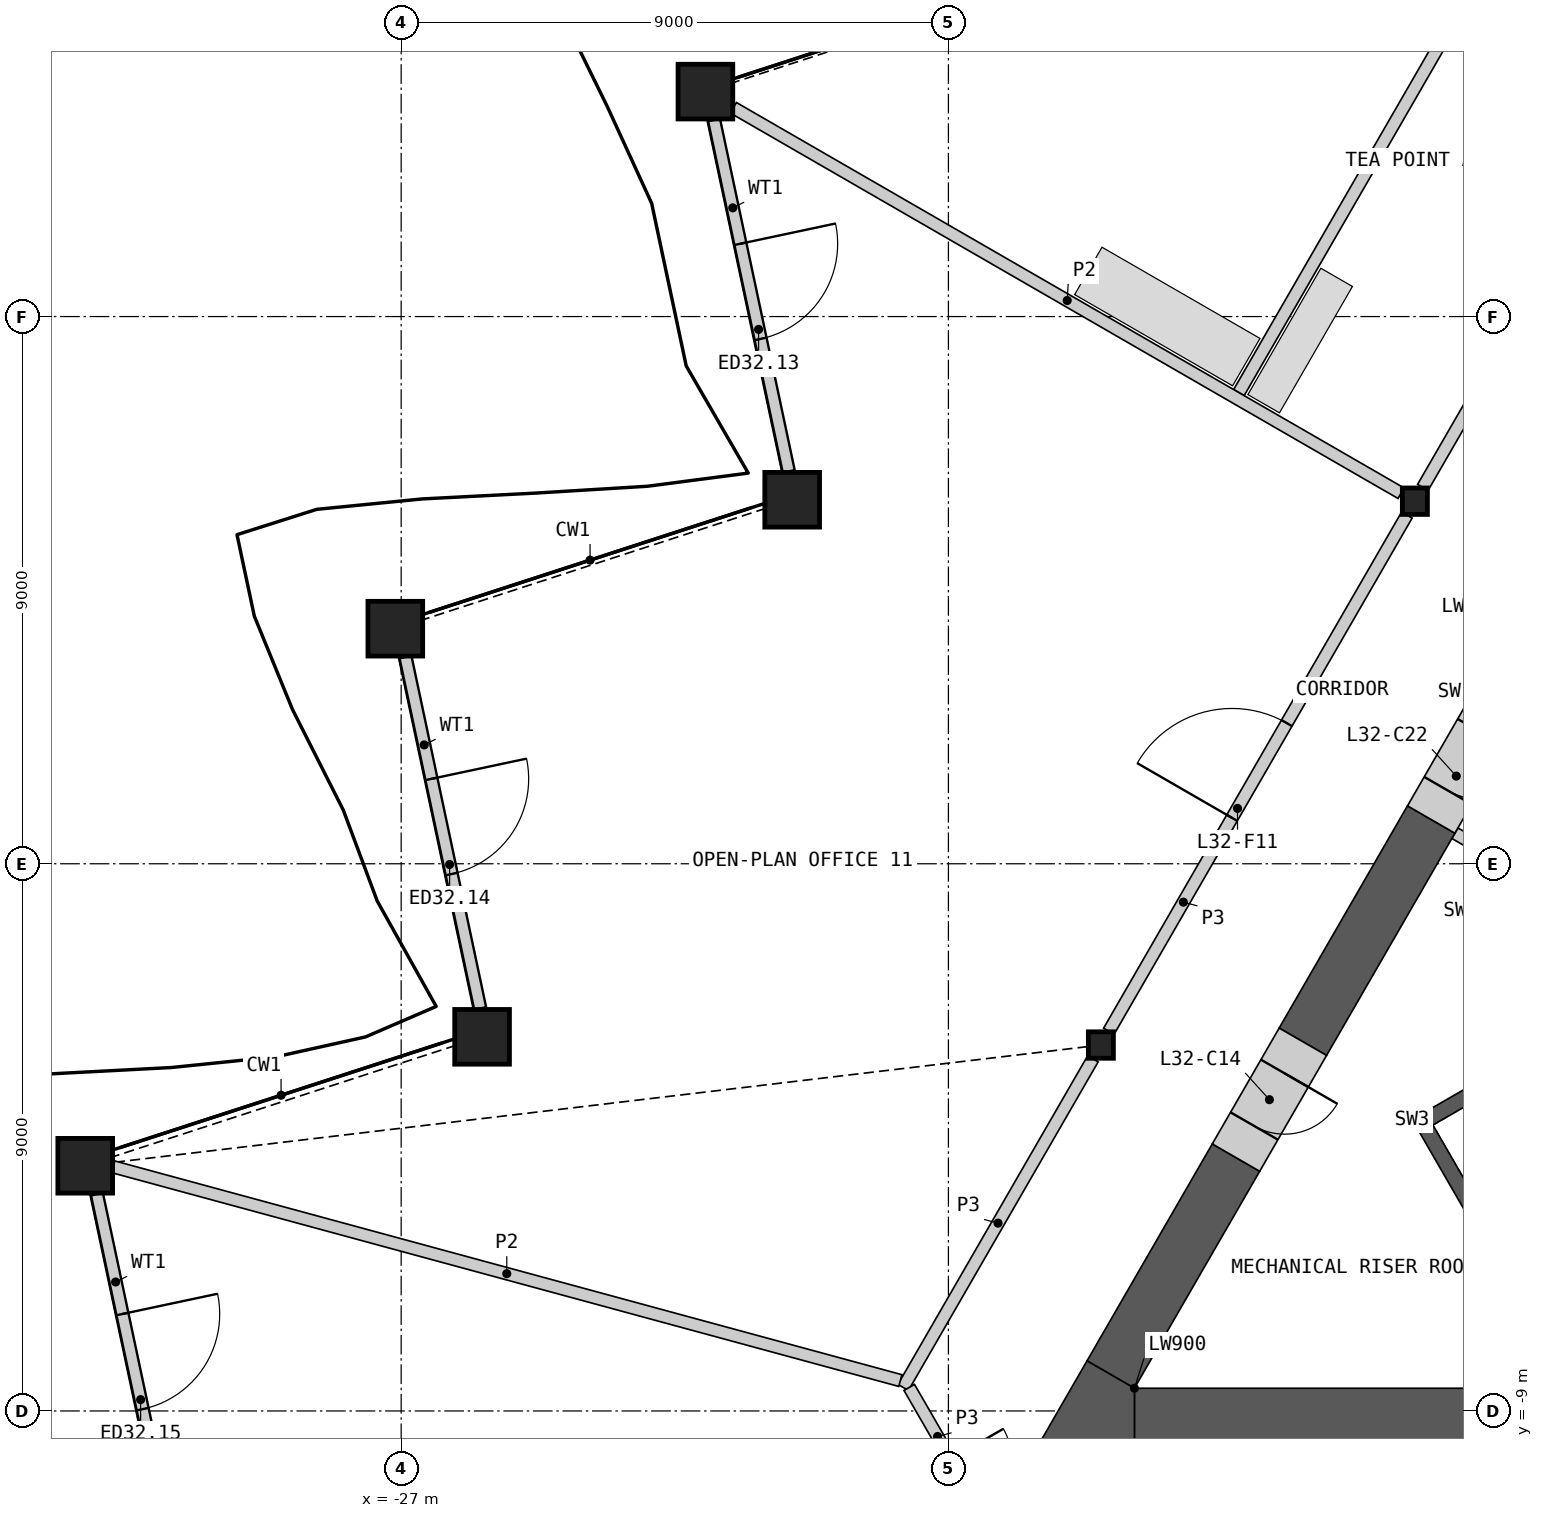
"""IFC4 building model, lengths in metres.
Left out: names, types, materials, properties, quantities, classifications, styles, units other than length and angle.
Written with IfcOpenShell. Run it as: python <this file> out.ifc"""

import sys

from ifc_helpers import new_model, si_unit, direction, frame, frame_2d, origin, origin_2d, place, context, subcontext, project, spatial, polyline, rectangle, hollow_rectangle, i_section, outline, extrude, element, fill, save


model = new_model("IFC4")
c1 = context("Model", 3, precision=1e-05, world=origin(), true_north=direction((0.0, 1.0)))
c2 = subcontext(c1, "Body", "Model", "MODEL_VIEW")
j1 = project(units=[si_unit("LENGTHUNIT", "METRE"), si_unit("PLANEANGLEUNIT", "RADIAN")], contexts=[c1])
p1 = place(None, origin())
s1 = spatial("IfcSite", under=j1, at=p1, CompositionType="ELEMENT")
p2 = place(p1, origin())
s2 = spatial("IfcBuilding", under=s1, at=p2, CompositionType="ELEMENT")
p3 = place(p2, frame((0.0, 0.0, 150.0)))
s3 = spatial("IfcBuildingStorey", under=s2, at=p3, CompositionType="ELEMENT", Elevation=150.0)
for number, where, z_axis, x_axis in (
    (1, (-21.996, 12.699, 0.0), (0.0, 0.0, 1.0), (1.0, 0.0, 0.0)),
    (2, (-20.57, 5.987, 0.0), (0.0, 0.0, 1.0), (1.0, 0.0, 0.0)),
    (3, (-27.096, 3.866, 0.0), (0.0, 0.0, 1.0), (1.0, 0.0, 0.0)),
    (4, (-25.669, -2.846, 0.0), (0.0, 0.0, 1.0), (1.0, 0.0, 0.0)),
    (5, (-32.196, -4.967, 0.0), (0.0, 0.0, 1.0), (1.0, 0.0, 0.0)),
):
    element("IfcColumn", number, at=place(p3, frame(where, z_axis=z_axis, x_axis=x_axis)), inside=s3, PredefinedType="COLUMN", context=c2, shape_type="SweptSolid", body=[
        extrude(hollow_rectangle(XDim=0.9, YDim=0.9, WallThickness=0.06, at=origin_2d()), origin(), (0.0, 0.0, 1.0), 4.2),
    ])
for number, where, z_axis, x_axis in (
    (6, (-10.328, 5.963, 0.0), (0.0, 0.0, 1.0), (1.0, 0.0, 0.0)),
    (7, (-15.493, -2.982, 0.0), (0.0, 0.0, 1.0), (1.0, 0.0, 0.0)),
):
    element("IfcColumn", number, at=place(p3, frame(where, z_axis=z_axis, x_axis=x_axis)), inside=s3, PredefinedType="COLUMN", context=c2, shape_type="SweptSolid", body=[
        extrude(i_section(OverallWidth=0.412, OverallDepth=0.435, WebThickness=0.036, FlangeThickness=0.057, at=origin_2d()), origin(), (0.0, 0.0, 1.0), 4.2),
    ])
p4 = place(p3, frame((-21.854, 12.233, 0.0), z_axis=(0.0, 0.0, 1.0), x_axis=(0.207925965623, -0.978144566421, 0.0)))
e8 = element("IfcWall", 8, at=p4, inside=s3, PredefinedType="SOLIDWALL", context=c2, shape_type="SweptSolid", body=[
    extrude(rectangle(XDim=5.908, YDim=0.2, at=frame_2d((2.954, 0.0))), origin(), (0.0, 0.0, 1.0), 3.189),
])
p5 = place(p4, frame((2.081, 0.0, 0.0)))
e9 = element("IfcOpeningElement", 9, at=p5, cuts=e8, PredefinedType="OPENING", context=c2, shape_type="SweptSolid", body=[
    extrude(rectangle(XDim=1.6, YDim=2.4, at=frame_2d((0.8, 1.2))), frame((0.0, 0.11, 0.0), z_axis=(0.0, -1.0, 0.0), x_axis=(1.0, 0.0, 0.0)), (0.0, 0.0, 1.0), 0.22),
])
p6 = place(p3, frame((-26.929, 3.4, 0.0), z_axis=(0.0, 0.0, 1.0), x_axis=(0.207917562075, -0.978146352741, 0.0)))
e10 = element("IfcWall", 10, at=p6, inside=s3, PredefinedType="SOLIDWALL", context=c2, shape_type="SweptSolid", body=[
    extrude(rectangle(XDim=5.909, YDim=0.2, at=frame_2d((2.954, 0.0))), origin(), (0.0, 0.0, 1.0), 3.189),
])
p7 = place(p6, frame((2.048, 0.0, 0.0)))
e11 = element("IfcOpeningElement", 11, at=p7, cuts=e10, PredefinedType="OPENING", context=c2, shape_type="SweptSolid", body=[
    extrude(rectangle(XDim=1.6, YDim=2.4, at=frame_2d((0.8, 1.2))), frame((0.0, 0.11, 0.0), z_axis=(0.0, -1.0, 0.0), x_axis=(1.0, 0.0, 0.0)), (0.0, 0.0, 1.0), 0.22),
])
p8 = place(p3, frame((-32.003, -5.434, 0.0), z_axis=(0.0, 0.0, 1.0), x_axis=(0.207886430801, -0.978152969575, 0.0)))
e12 = element("IfcWall", 12, at=p8, inside=s3, PredefinedType="SOLIDWALL", context=c2, shape_type="SweptSolid", body=[
    extrude(rectangle(XDim=5.908, YDim=0.2, at=frame_2d((2.954, 0.0))), origin(), (0.0, 0.0, 1.0), 3.189),
])
p9 = place(p8, frame((2.015, 0.0, 0.0)))
e13 = element("IfcOpeningElement", 13, at=p9, cuts=e12, PredefinedType="OPENING", context=c2, shape_type="SweptSolid", body=[
    extrude(rectangle(XDim=1.6, YDim=2.4, at=frame_2d((0.8, 1.2))), frame((0.0, 0.11, 0.0), z_axis=(0.0, -1.0, 0.0), x_axis=(1.0, 0.0, 0.0)), (0.0, 0.0, 1.0), 0.22),
])
p10 = place(p3, frame((-8.181, -0.357, 0.0), z_axis=(0.0, 0.0, 1.0), x_axis=(-0.866024871741, 0.500000921525, 0.0)))
e14 = element("IfcWall", 14, at=p10, inside=s3, PredefinedType="SHEAR", context=c2, shape_type="SweptSolid", body=[
    extrude(rectangle(XDim=1.72, YDim=0.2, at=frame_2d((0.86, 0.0))), origin(), (0.0, 0.0, 1.0), 3.8),
])
p11 = place(p3, origin())
e15 = element("IfcWall", 15, at=p11, inside=s3, PredefinedType="SHEAR", context=c2, shape_type="SweptSolid", body=[
    extrude(outline(polyline([(-5.307, -1.281), (-10.374, -4.206), (-10.032, -4.298), (-5.182, -1.498), (-5.307, -1.281)])), origin(), (0.0, 0.0, 1.0), 3.8),
])
p12 = place(p3, origin())
e16 = element("IfcWall", 16, at=p12, inside=s3, PredefinedType="SHEAR", context=c2, shape_type="SweptSolid", body=[
    extrude(outline(polyline([(-10.374, -4.206), (-8.83, -6.881), (-8.738, -6.539), (-10.032, -4.298), (-10.374, -4.206)])), origin(), (0.0, 0.0, 1.0), 3.8),
])
p13 = place(p3, frame((-14.941, -9.076, 0.0), z_axis=(0.0, 0.0, 1.0), x_axis=(1.0, 0.0, 0.0)))
e17 = element("IfcWall", 17, at=p13, inside=s3, PredefinedType="SHEAR", context=c2, shape_type="SweptSolid", body=[
    extrude(rectangle(XDim=7.649, YDim=0.9, at=frame_2d((3.824, 0.0))), origin(), (0.0, 0.0, 1.0), 3.8),
])
p14 = place(p3, frame((-10.06, 0.728, 0.0), z_axis=(0.0, 0.0, 1.0), x_axis=(-0.500021220092, -0.866013152012, 0.0)))
e18 = element("IfcWall", 18, at=p14, inside=s3, PredefinedType="SHEAR", context=c2, shape_type="SweptSolid", body=[
    extrude(rectangle(XDim=4.22, YDim=0.9, at=frame_2d((2.11, 0.0))), origin(), (0.0, 0.0, 1.0), 3.8),
])
p15 = place(p3, frame((-13.271, -4.833, 0.0), z_axis=(0.0, 0.0, 1.0), x_axis=(-0.499994272862, -0.866028710324, 0.0)))
e19 = element("IfcWall", 19, at=p15, inside=s3, PredefinedType="SHEAR", context=c2, shape_type="SweptSolid", body=[
    extrude(rectangle(XDim=4.121, YDim=0.9, at=frame_2d((2.06, 0.0))), origin(), (0.0, 0.0, 1.0), 3.8),
])
p16 = place(p3, origin())
e20 = element("IfcWall", 20, at=p16, inside=s3, PredefinedType="SHEAR", context=c2, shape_type="SweptSolid", body=[
    extrude(outline(polyline([(-14.941, -8.626), (-14.941, -9.526), (-16.5, -9.526), (-15.721, -8.176), (-14.941, -8.626)])), origin(), (0.0, 0.0, 1.0), 3.8),
])
p17 = place(p3, frame((-12.171, -2.927, 0.0), z_axis=(0.0, 0.0, 1.0), x_axis=(-0.499946605688, -0.86605622881, 0.0)))
e21 = element("IfcWall", 21, at=p17, inside=s3, PredefinedType="SHEAR", context=c2, shape_type="SweptSolid", body=[
    extrude(rectangle(XDim=2.2, YDim=0.9, at=frame_2d((1.1, 0.0))), origin(), (0.0, 0.0, 1.0), 3.8),
])
p18 = place(p17, frame((0.6, 0.0, 0.0)))
e22 = element("IfcOpeningElement", 22, at=p18, cuts=e21, PredefinedType="OPENING", context=c2, shape_type="SweptSolid", body=[
    extrude(rectangle(XDim=1.0, YDim=2.1, at=frame_2d((0.5, 1.05))), frame((0.0, 0.46, 0.0), z_axis=(0.0, -1.0, 0.0), x_axis=(1.0, 0.0, 0.0)), (0.0, 0.0, 1.0), 0.92),
])
p19 = place(p3, frame((-8.96, 2.633, 0.0), z_axis=(0.0, 0.0, 1.0), x_axis=(-0.50002983664, -0.866008176907, 0.0)))
e23 = element("IfcWall", 23, at=p19, inside=s3, PredefinedType="SHEAR", context=c2, shape_type="SweptSolid", body=[
    extrude(rectangle(XDim=2.2, YDim=0.9, at=frame_2d((1.1, 0.0))), origin(), (0.0, 0.0, 1.0), 3.8),
])
p20 = place(p19, frame((0.55, 0.0, 0.0)))
e24 = element("IfcOpeningElement", 24, at=p20, cuts=e23, PredefinedType="OPENING", context=c2, shape_type="SweptSolid", body=[
    extrude(rectangle(XDim=1.1, YDim=2.1, at=frame_2d((0.55, 1.05))), frame((0.0, 0.46, 0.0), z_axis=(0.0, -1.0, 0.0), x_axis=(1.0, 0.0, 0.0)), (0.0, 0.0, 1.0), 0.92),
])
p21 = place(p3, frame((-15.361, -2.754, 0.0), z_axis=(0.0, 0.0, 1.0), x_axis=(0.500004141693, 0.866023012564, 0.0)))
e25 = element("IfcWall", 25, at=p21, inside=s3, PredefinedType="PARTITIONING", context=c2, shape_type="SweptSolid", body=[
    extrude(rectangle(XDim=9.803, YDim=0.2, at=frame_2d((4.902, 0.0))), origin(), (0.0, 0.0, 1.0), 3.8),
])
p22 = place(p21, frame((4.052, 0.0, 0.0)))
e26 = element("IfcOpeningElement", 26, at=p22, cuts=e25, PredefinedType="OPENING", context=c2, shape_type="SweptSolid", body=[
    extrude(rectangle(XDim=1.8, YDim=2.1, at=frame_2d((0.9, 1.05))), frame((0.0, 0.11, 0.0), z_axis=(0.0, -1.0, 0.0), x_axis=(1.0, 0.0, 0.0)), (0.0, 0.0, 1.0), 0.22),
])
p23 = place(p3, frame((-10.197, 6.19, 0.0), z_axis=(0.0, 0.0, 1.0), x_axis=(0.500012035596, 0.866018454918, 0.0)))
e27 = element("IfcWall", 27, at=p23, inside=s3, PredefinedType="PARTITIONING", context=c2, shape_type="SweptSolid", body=[
    extrude(rectangle(XDim=9.803, YDim=0.2, at=frame_2d((4.902, 0.0))), origin(), (0.0, 0.0, 1.0), 3.8),
])
p24 = place(p23, frame((4.376, 0.0, 0.0)))
e28 = element("IfcOpeningElement", 28, at=p24, cuts=e27, PredefinedType="OPENING", context=c2, shape_type="SweptSolid", body=[
    extrude(rectangle(XDim=0.95, YDim=2.1, at=frame_2d((0.475, 1.05))), frame((0.0, 0.11, 0.0), z_axis=(0.0, -1.0, 0.0), x_axis=(1.0, 0.0, 0.0)), (0.0, 0.0, 1.0), 0.22),
])
p25 = place(p3, frame((-18.744, -8.613, 0.0), z_axis=(0.0, 0.0, 1.0), x_axis=(0.499997920671, 0.866026604282, 0.0)))
e29 = element("IfcWall", 29, at=p25, inside=s3, PredefinedType="PARTITIONING", context=c2, shape_type="SweptSolid", body=[
    extrude(rectangle(XDim=6.24, YDim=0.2, at=frame_2d((3.12, 0.0))), origin(), (0.0, 0.0, 1.0), 3.8),
])
p26 = place(p3, frame((-18.644, -8.613, 0.0), z_axis=(0.0, 0.0, 1.0), x_axis=(0.499958791762, -0.866049194065, 0.0)))
e30 = element("IfcWall", 30, at=p26, inside=s3, PredefinedType="PARTITIONING", context=c2, shape_type="SweptSolid", body=[
    extrude(rectangle(XDim=3.726, YDim=0.2, at=frame_2d((1.863, 0.0))), origin(), (0.0, 0.0, 1.0), 3.8),
])
p27 = place(p26, frame((1.363, 0.0, 0.0)))
e31 = element("IfcOpeningElement", 31, at=p27, cuts=e30, PredefinedType="OPENING", context=c2, shape_type="SweptSolid", body=[
    extrude(rectangle(XDim=1.0, YDim=2.1, at=frame_2d((0.5, 1.05))), frame((0.0, 0.11, 0.0), z_axis=(0.0, -1.0, 0.0), x_axis=(1.0, 0.0, 0.0)), (0.0, 0.0, 1.0), 0.22),
])
p28 = place(p3, frame((-13.223, 7.75, 0.0), z_axis=(0.0, 0.0, 1.0), x_axis=(0.499991226912, 0.86603046887, 0.0)))
e32 = element("IfcWall", 32, at=p28, inside=s3, PredefinedType="PARTITIONING", context=c2, shape_type="SweptSolid", body=[
    extrude(rectangle(XDim=17.429, YDim=0.2, at=frame_2d((8.715, 0.0))), origin(), (0.0, 0.0, 1.0), 2.885),
])
p29 = place(p28, frame((8.792, 0.0, 0.0)))
e33 = element("IfcOpeningElement", 33, at=p29, cuts=e32, PredefinedType="OPENING", context=c2, shape_type="SweptSolid", body=[
    extrude(rectangle(XDim=0.95, YDim=2.1, at=frame_2d((0.475, 1.05))), frame((0.0, 0.11, 0.0), z_axis=(0.0, -1.0, 0.0), x_axis=(1.0, 0.0, 0.0)), (0.0, 0.0, 1.0), 0.22),
])
p30 = place(p3, frame((-31.736, -4.984, 0.0), z_axis=(0.0, 0.0, 1.0), x_axis=(0.965038802525, -0.262107057556, 0.0)))
e34 = element("IfcWall", 34, at=p30, inside=s3, PredefinedType="PARTITIONING", context=c2, shape_type="SweptSolid", body=[
    extrude(rectangle(XDim=13.415, YDim=0.2, at=frame_2d((6.708, 0.0))), origin(), (0.0, 0.0, 1.0), 2.885),
])
p31 = place(p3, frame((-21.536, 12.434, 0.0), z_axis=(0.0, 0.0, 1.0), x_axis=(0.86602461759, -0.500001361726, 0.0)))
e35 = element("IfcWall", 35, at=p31, inside=s3, PredefinedType="PARTITIONING", context=c2, shape_type="SweptSolid", body=[
    extrude(rectangle(XDim=12.679, YDim=0.2, at=frame_2d((6.34, 0.0))), origin(), (0.0, 0.0, 1.0), 2.885),
])
p32 = place(p5, origin())
e36 = element("IfcDoor", 36, at=p32, inside=s3, OperationType="DOUBLE_DOOR_SINGLE_SWING", PredefinedType="DOOR", context=c2, shape_type="SweptSolid", body=[
    extrude(rectangle(XDim=1.6, YDim=2.4, at=frame_2d((0.8, 1.2))), frame((0.0, 0.025, 0.0), z_axis=(0.0, -1.0, 0.0), x_axis=(1.0, 0.0, 0.0)), (0.0, 0.0, 1.0), 0.05),
])
fill(e9, e36)
p33 = place(p7, origin())
e37 = element("IfcDoor", 37, at=p33, inside=s3, OperationType="DOUBLE_DOOR_SINGLE_SWING", PredefinedType="DOOR", context=c2, shape_type="SweptSolid", body=[
    extrude(rectangle(XDim=1.6, YDim=2.4, at=frame_2d((0.8, 1.2))), frame((0.0, 0.025, 0.0), z_axis=(0.0, -1.0, 0.0), x_axis=(1.0, 0.0, 0.0)), (0.0, 0.0, 1.0), 0.05),
])
fill(e11, e37)
p34 = place(p9, origin())
e38 = element("IfcDoor", 38, at=p34, inside=s3, OperationType="DOUBLE_DOOR_SINGLE_SWING", PredefinedType="DOOR", context=c2, shape_type="SweptSolid", body=[
    extrude(rectangle(XDim=1.6, YDim=2.4, at=frame_2d((0.8, 1.2))), frame((0.0, 0.025, 0.0), z_axis=(0.0, -1.0, 0.0), x_axis=(1.0, 0.0, 0.0)), (0.0, 0.0, 1.0), 0.05),
])
fill(e13, e38)
p35 = place(p18, origin())
e39 = element("IfcDoor", 39, at=p35, inside=s3, OperationType="SINGLE_SWING_LEFT", PredefinedType="DOOR", context=c2, shape_type="SweptSolid", body=[
    extrude(rectangle(XDim=1.0, YDim=2.1, at=frame_2d((0.5, 1.05))), frame((0.0, 0.205, 0.0), z_axis=(0.0, -1.0, 0.0), x_axis=(1.0, 0.0, 0.0)), (0.0, 0.0, 1.0), 0.05),
])
fill(e22, e39)
p36 = place(p20, origin())
e40 = element("IfcDoor", 40, at=p36, inside=s3, OperationType="SINGLE_SWING_LEFT", PredefinedType="DOOR", context=c2, shape_type="SweptSolid", body=[
    extrude(rectangle(XDim=1.1, YDim=2.1, at=frame_2d((0.55, 1.05))), frame((0.0, 0.205, 0.0), z_axis=(0.0, -1.0, 0.0), x_axis=(1.0, 0.0, 0.0)), (0.0, 0.0, 1.0), 0.05),
])
fill(e24, e40)
p37 = place(p22, origin())
e41 = element("IfcDoor", 41, at=p37, inside=s3, OperationType="DOUBLE_DOOR_SINGLE_SWING", PredefinedType="DOOR", context=c2, shape_type="SweptSolid", body=[
    extrude(rectangle(XDim=1.8, YDim=2.1, at=frame_2d((0.9, 1.05))), frame((0.0, 0.025, 0.0), z_axis=(0.0, -1.0, 0.0), x_axis=(1.0, 0.0, 0.0)), (0.0, 0.0, 1.0), 0.05),
])
fill(e26, e41)
save(model, sys.argv[1])
